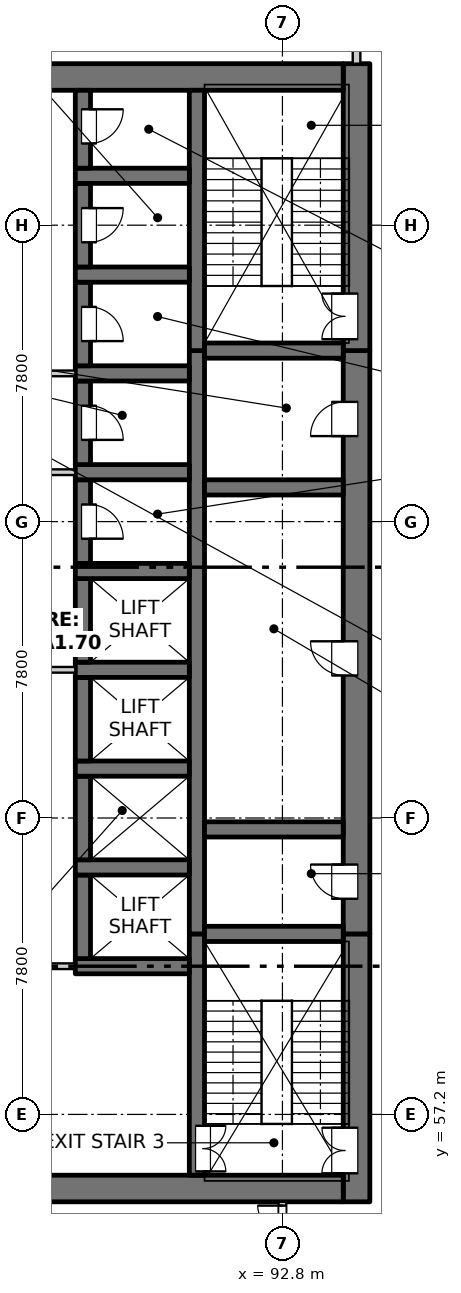
"""IFC4 building model, lengths in metres.
Left out: names, types, materials, properties, quantities, classifications, styles, units other than length and angle.
Written with IfcOpenShell. Run it as: python <this file> out.ifc"""

import sys

from ifc_helpers import new_model, si_unit, direction, frame, frame_2d, origin, place, context, subcontext, project, spatial, rectangle, extrude, element, fill, save


model = new_model("IFC4")
c1 = context("Model", 3, precision=1e-05, world=origin(), true_north=direction((0.0, 1.0)))
c2 = subcontext(c1, "Body", "Model", "MODEL_VIEW")
j1 = project(units=[si_unit("LENGTHUNIT", "METRE"), si_unit("PLANEANGLEUNIT", "RADIAN")], contexts=[c1])
p1 = place(None, origin())
s1 = spatial("IfcSite", under=j1, at=p1, CompositionType="ELEMENT")
p2 = place(p1, origin())
s2 = spatial("IfcBuilding", under=s1, at=p2, CompositionType="ELEMENT")
p3 = place(p2, frame((0.0, 0.0, 6.0)))
s3 = spatial("IfcBuildingStorey", under=s2, at=p3, CompositionType="ELEMENT", Elevation=6.0)
p4 = place(p3, frame((94.75, 54.9, -0.3), z_axis=(0.0, 0.0, 1.0), x_axis=(0.0, 1.0, 0.0)))
e1 = element("IfcWall", 1, at=p4, inside=s3, PredefinedType="SOLIDWALL", context=c2, shape_type="SweptSolid", body=[
    extrude(rectangle(XDim=7.05, YDim=0.7, at=frame_2d((3.525, 0.0))), origin(), (0.0, 0.0, 1.0), 4.5),
])
p5 = place(p4, frame((0.75, 0.0, 0.3)))
e2 = element("IfcOpeningElement", 2, at=p5, cuts=e1, PredefinedType="OPENING", context=c2, shape_type="SweptSolid", body=[
    extrude(rectangle(XDim=1.2, YDim=2.1, at=frame_2d((0.6, 1.05))), frame((0.0, 0.36, 0.0), z_axis=(0.0, -1.0, 0.0), x_axis=(1.0, 0.0, 0.0)), (0.0, 0.0, 1.0), 0.72),
])
p6 = place(p3, frame((94.75, 61.95, -0.3), z_axis=(0.0, 0.0, 1.0), x_axis=(0.0, 1.0, 0.0)))
e3 = element("IfcWall", 3, at=p6, inside=s3, PredefinedType="SOLIDWALL", context=c2, shape_type="SweptSolid", body=[
    extrude(rectangle(XDim=15.35, YDim=0.7, at=frame_2d((7.675, 0.0))), origin(), (0.0, 0.0, 1.0), 4.5),
])
p7 = place(p6, frame((0.925, 0.0, 0.3)))
e4 = element("IfcOpeningElement", 4, at=p7, cuts=e3, PredefinedType="OPENING", context=c2, shape_type="SweptSolid", body=[
    extrude(rectangle(XDim=0.9, YDim=2.1, at=frame_2d((0.45, 1.05))), frame((0.0, 0.36, 0.0), z_axis=(0.0, -1.0, 0.0), x_axis=(1.0, 0.0, 0.0)), (0.0, 0.0, 1.0), 0.72),
])
p8 = place(p6, frame((6.8, 0.0, 0.3)))
e5 = element("IfcOpeningElement", 5, at=p8, cuts=e3, PredefinedType="OPENING", context=c2, shape_type="SweptSolid", body=[
    extrude(rectangle(XDim=0.9, YDim=2.1, at=frame_2d((0.45, 1.05))), frame((0.0, 0.36, 0.0), z_axis=(0.0, -1.0, 0.0), x_axis=(1.0, 0.0, 0.0)), (0.0, 0.0, 1.0), 0.72),
])
p9 = place(p6, frame((13.1, 0.0, 0.3)))
e6 = element("IfcOpeningElement", 6, at=p9, cuts=e3, PredefinedType="OPENING", context=c2, shape_type="SweptSolid", body=[
    extrude(rectangle(XDim=0.9, YDim=2.1, at=frame_2d((0.45, 1.05))), frame((0.0, 0.36, 0.0), z_axis=(0.0, -1.0, 0.0), x_axis=(1.0, 0.0, 0.0)), (0.0, 0.0, 1.0), 0.72),
])
p10 = place(p3, frame((94.75, 77.3, -0.3), z_axis=(0.0, 0.0, 1.0), x_axis=(0.0, 1.0, 0.0)))
e7 = element("IfcWall", 7, at=p10, inside=s3, PredefinedType="SOLIDWALL", context=c2, shape_type="SweptSolid", body=[
    extrude(rectangle(XDim=7.55, YDim=0.7, at=frame_2d((3.775, 0.0))), origin(), (0.0, 0.0, 1.0), 4.5),
])
p11 = place(p10, frame((0.3, 0.0, 0.3)))
e8 = element("IfcOpeningElement", 8, at=p11, cuts=e7, PredefinedType="OPENING", context=c2, shape_type="SweptSolid", body=[
    extrude(rectangle(XDim=1.2, YDim=2.1, at=frame_2d((0.6, 1.05))), frame((0.0, 0.36, 0.0), z_axis=(0.0, -1.0, 0.0), x_axis=(1.0, 0.0, 0.0)), (0.0, 0.0, 1.0), 0.72),
])
p12 = place(p3, frame((75.6, 55.25, -0.3), z_axis=(0.0, 0.0, 1.0), x_axis=(1.0, 0.0, 0.0)))
e9 = element("IfcWall", 9, at=p12, inside=s3, PredefinedType="SOLIDWALL", context=c2, shape_type="SweptSolid", body=[
    extrude(rectangle(XDim=18.8, YDim=0.7, at=frame_2d((9.4, 0.0))), origin(), (0.0, 0.0, 1.0), 4.5),
])
p13 = place(p12, frame((8.65, 0.0, 0.3)))
e10 = element("IfcOpeningElement", 10, at=p13, cuts=e9, PredefinedType="OPENING", context=c2, shape_type="SweptSolid", body=[
    extrude(rectangle(XDim=1.5, YDim=2.1, at=frame_2d((0.75, 1.05))), frame((0.0, 0.36, 0.0), z_axis=(0.0, -1.0, 0.0), x_axis=(1.0, 0.0, 0.0)), (0.0, 0.0, 1.0), 0.72),
])
p14 = place(p3, frame((75.6, 84.5, -0.3), z_axis=(0.0, 0.0, 1.0), x_axis=(1.0, 0.0, 0.0)))
e11 = element("IfcWall", 11, at=p14, inside=s3, PredefinedType="SOLIDWALL", context=c2, shape_type="SweptSolid", body=[
    extrude(rectangle(XDim=18.8, YDim=0.7, at=frame_2d((9.4, 0.0))), origin(), (0.0, 0.0, 1.0), 4.5),
])
p15 = place(p3, frame((90.55, 55.6, -0.3), z_axis=(0.0, 0.0, 1.0), x_axis=(0.0, 1.0, 0.0)))
e12 = element("IfcWall", 12, at=p15, inside=s3, PredefinedType="SOLIDWALL", context=c2, shape_type="SweptSolid", body=[
    extrude(rectangle(XDim=6.35, YDim=0.4, at=frame_2d((3.175, 0.0))), origin(), (0.0, 0.0, 1.0), 4.5),
])
p16 = place(p15, frame((0.1, 0.0, 0.3)))
e13 = element("IfcOpeningElement", 13, at=p16, cuts=e12, PredefinedType="OPENING", context=c2, shape_type="SweptSolid", body=[
    extrude(rectangle(XDim=1.2, YDim=2.1, at=frame_2d((0.6, 1.05))), frame((0.0, 0.21, 0.0), z_axis=(0.0, -1.0, 0.0), x_axis=(1.0, 0.0, 0.0)), (0.0, 0.0, 1.0), 0.42),
])
p17 = place(p3, frame((90.55, 61.95, -0.3), z_axis=(0.0, 0.0, 1.0), x_axis=(0.0, 1.0, 0.0)))
e14 = element("IfcWall", 14, at=p17, inside=s3, PredefinedType="SOLIDWALL", context=c2, shape_type="SweptSolid", body=[
    extrude(rectangle(XDim=15.35, YDim=0.4, at=frame_2d((7.675, 0.0))), origin(), (0.0, 0.0, 1.0), 4.5),
])
p18 = place(p3, frame((90.55, 77.3, -0.3), z_axis=(0.0, 0.0, 1.0), x_axis=(0.0, 1.0, 0.0)))
e15 = element("IfcWall", 15, at=p18, inside=s3, PredefinedType="SOLIDWALL", context=c2, shape_type="SweptSolid", body=[
    extrude(rectangle(XDim=6.85, YDim=0.4, at=frame_2d((3.425, 0.0))), origin(), (0.0, 0.0, 1.0), 4.5),
])
p19 = place(p3, frame((87.35, 61.1, -0.3), z_axis=(0.0, 0.0, 1.0), x_axis=(1.0, 0.0, 0.0)))
e16 = element("IfcWall", 16, at=p19, inside=s3, PredefinedType="SOLIDWALL", context=c2, shape_type="SweptSolid", body=[
    extrude(rectangle(XDim=3.0, YDim=0.4, at=frame_2d((1.5, 0.0))), origin(), (0.0, 0.0, 1.0), 4.5),
])
p20 = place(p3, frame((87.55, 61.3, -0.3), z_axis=(0.0, 0.0, 1.0), x_axis=(0.0, 1.0, 0.0)))
e17 = element("IfcWall", 17, at=p20, inside=s3, PredefinedType="SOLIDWALL", context=c2, shape_type="SweptSolid", body=[
    extrude(rectangle(XDim=2.2, YDim=0.4, at=frame_2d((1.1, 0.0))), origin(), (0.0, 0.0, 1.0), 4.5),
])
p21 = place(p3, frame((87.35, 63.7, -0.3), z_axis=(0.0, 0.0, 1.0), x_axis=(1.0, 0.0, 0.0)))
e18 = element("IfcWall", 18, at=p21, inside=s3, PredefinedType="SOLIDWALL", context=c2, shape_type="SweptSolid", body=[
    extrude(rectangle(XDim=3.0, YDim=0.4, at=frame_2d((1.5, 0.0))), origin(), (0.0, 0.0, 1.0), 4.5),
])
p22 = place(p3, frame((87.55, 63.9, -0.3), z_axis=(0.0, 0.0, 1.0), x_axis=(0.0, 1.0, 0.0)))
e19 = element("IfcWall", 19, at=p22, inside=s3, PredefinedType="SOLIDWALL", context=c2, shape_type="SweptSolid", body=[
    extrude(rectangle(XDim=2.2, YDim=0.4, at=frame_2d((1.1, 0.0))), origin(), (0.0, 0.0, 1.0), 4.5),
])
p23 = place(p3, frame((87.35, 66.3, -0.3), z_axis=(0.0, 0.0, 1.0), x_axis=(1.0, 0.0, 0.0)))
e20 = element("IfcWall", 20, at=p23, inside=s3, PredefinedType="SOLIDWALL", context=c2, shape_type="SweptSolid", body=[
    extrude(rectangle(XDim=3.0, YDim=0.4, at=frame_2d((1.5, 0.0))), origin(), (0.0, 0.0, 1.0), 4.5),
])
p24 = place(p3, frame((87.55, 66.5, -0.3), z_axis=(0.0, 0.0, 1.0), x_axis=(0.0, 1.0, 0.0)))
e21 = element("IfcWall", 21, at=p24, inside=s3, PredefinedType="SOLIDWALL", context=c2, shape_type="SweptSolid", body=[
    extrude(rectangle(XDim=2.2, YDim=0.4, at=frame_2d((1.1, 0.0))), origin(), (0.0, 0.0, 1.0), 4.5),
])
p25 = place(p3, frame((87.35, 68.9, -0.3), z_axis=(0.0, 0.0, 1.0), x_axis=(1.0, 0.0, 0.0)))
e22 = element("IfcWall", 22, at=p25, inside=s3, PredefinedType="SOLIDWALL", context=c2, shape_type="SweptSolid", body=[
    extrude(rectangle(XDim=3.0, YDim=0.4, at=frame_2d((1.5, 0.0))), origin(), (0.0, 0.0, 1.0), 4.5),
])
p26 = place(p3, frame((87.55, 69.1, -0.3), z_axis=(0.0, 0.0, 1.0), x_axis=(0.0, 1.0, 0.0)))
e23 = element("IfcWall", 23, at=p26, inside=s3, PredefinedType="SOLIDWALL", context=c2, shape_type="SweptSolid", body=[
    extrude(rectangle(XDim=2.2, YDim=0.4, at=frame_2d((1.1, 0.0))), origin(), (0.0, 0.0, 1.0), 4.5),
])
p27 = place(p3, frame((87.35, 71.5, -0.3), z_axis=(0.0, 0.0, 1.0), x_axis=(1.0, 0.0, 0.0)))
e24 = element("IfcWall", 24, at=p27, inside=s3, PredefinedType="SOLIDWALL", context=c2, shape_type="SweptSolid", body=[
    extrude(rectangle(XDim=3.0, YDim=0.4, at=frame_2d((1.5, 0.0))), origin(), (0.0, 0.0, 1.0), 4.5),
])
p28 = place(p3, frame((87.55, 71.7, -0.3), z_axis=(0.0, 0.0, 1.0), x_axis=(0.0, 1.0, 0.0)))
e25 = element("IfcWall", 25, at=p28, inside=s3, PredefinedType="SOLIDWALL", context=c2, shape_type="SweptSolid", body=[
    extrude(rectangle(XDim=2.2, YDim=0.4, at=frame_2d((1.1, 0.0))), origin(), (0.0, 0.0, 1.0), 4.5),
])
p29 = place(p28, frame((0.65, 0.0, 0.3)))
e26 = element("IfcOpeningElement", 26, at=p29, cuts=e25, PredefinedType="OPENING", context=c2, shape_type="SweptSolid", body=[
    extrude(rectangle(XDim=0.9, YDim=2.1, at=frame_2d((0.45, 1.05))), frame((0.0, 0.21, 0.0), z_axis=(0.0, -1.0, 0.0), x_axis=(1.0, 0.0, 0.0)), (0.0, 0.0, 1.0), 0.42),
])
p30 = place(p3, frame((87.35, 74.1, -0.3), z_axis=(0.0, 0.0, 1.0), x_axis=(1.0, 0.0, 0.0)))
e27 = element("IfcWall", 27, at=p30, inside=s3, PredefinedType="SOLIDWALL", context=c2, shape_type="SweptSolid", body=[
    extrude(rectangle(XDim=3.0, YDim=0.4, at=frame_2d((1.5, 0.0))), origin(), (0.0, 0.0, 1.0), 4.5),
])
p31 = place(p3, frame((87.55, 74.3, -0.3), z_axis=(0.0, 0.0, 1.0), x_axis=(0.0, 1.0, 0.0)))
e28 = element("IfcWall", 28, at=p31, inside=s3, PredefinedType="SOLIDWALL", context=c2, shape_type="SweptSolid", body=[
    extrude(rectangle(XDim=2.2, YDim=0.4, at=frame_2d((1.1, 0.0))), origin(), (0.0, 0.0, 1.0), 4.5),
])
p32 = place(p31, frame((0.65, 0.0, 0.3)))
e29 = element("IfcOpeningElement", 29, at=p32, cuts=e28, PredefinedType="OPENING", context=c2, shape_type="SweptSolid", body=[
    extrude(rectangle(XDim=0.9, YDim=2.1, at=frame_2d((0.45, 1.05))), frame((0.0, 0.21, 0.0), z_axis=(0.0, -1.0, 0.0), x_axis=(1.0, 0.0, 0.0)), (0.0, 0.0, 1.0), 0.42),
])
p33 = place(p3, frame((87.35, 76.7, -0.3), z_axis=(0.0, 0.0, 1.0), x_axis=(1.0, 0.0, 0.0)))
e30 = element("IfcWall", 30, at=p33, inside=s3, PredefinedType="SOLIDWALL", context=c2, shape_type="SweptSolid", body=[
    extrude(rectangle(XDim=3.0, YDim=0.4, at=frame_2d((1.5, 0.0))), origin(), (0.0, 0.0, 1.0), 4.5),
])
p34 = place(p3, frame((87.55, 76.9, -0.3), z_axis=(0.0, 0.0, 1.0), x_axis=(0.0, 1.0, 0.0)))
e31 = element("IfcWall", 31, at=p34, inside=s3, PredefinedType="SOLIDWALL", context=c2, shape_type="SweptSolid", body=[
    extrude(rectangle(XDim=2.2, YDim=0.4, at=frame_2d((1.1, 0.0))), origin(), (0.0, 0.0, 1.0), 4.5),
])
p35 = place(p34, frame((0.65, 0.0, 0.3)))
e32 = element("IfcOpeningElement", 32, at=p35, cuts=e31, PredefinedType="OPENING", context=c2, shape_type="SweptSolid", body=[
    extrude(rectangle(XDim=0.9, YDim=2.1, at=frame_2d((0.45, 1.05))), frame((0.0, 0.21, 0.0), z_axis=(0.0, -1.0, 0.0), x_axis=(1.0, 0.0, 0.0)), (0.0, 0.0, 1.0), 0.42),
])
p36 = place(p3, frame((87.35, 79.3, -0.3), z_axis=(0.0, 0.0, 1.0), x_axis=(1.0, 0.0, 0.0)))
e33 = element("IfcWall", 33, at=p36, inside=s3, PredefinedType="SOLIDWALL", context=c2, shape_type="SweptSolid", body=[
    extrude(rectangle(XDim=3.0, YDim=0.4, at=frame_2d((1.5, 0.0))), origin(), (0.0, 0.0, 1.0), 4.5),
])
p37 = place(p3, frame((87.55, 79.5, -0.3), z_axis=(0.0, 0.0, 1.0), x_axis=(0.0, 1.0, 0.0)))
e34 = element("IfcWall", 34, at=p37, inside=s3, PredefinedType="SOLIDWALL", context=c2, shape_type="SweptSolid", body=[
    extrude(rectangle(XDim=2.2, YDim=0.4, at=frame_2d((1.1, 0.0))), origin(), (0.0, 0.0, 1.0), 4.5),
])
p38 = place(p37, frame((0.65, 0.0, 0.3)))
e35 = element("IfcOpeningElement", 35, at=p38, cuts=e34, PredefinedType="OPENING", context=c2, shape_type="SweptSolid", body=[
    extrude(rectangle(XDim=0.9, YDim=2.1, at=frame_2d((0.45, 1.05))), frame((0.0, 0.21, 0.0), z_axis=(0.0, -1.0, 0.0), x_axis=(1.0, 0.0, 0.0)), (0.0, 0.0, 1.0), 0.42),
])
p39 = place(p3, frame((87.35, 81.9, -0.3), z_axis=(0.0, 0.0, 1.0), x_axis=(1.0, 0.0, 0.0)))
e36 = element("IfcWall", 36, at=p39, inside=s3, PredefinedType="SOLIDWALL", context=c2, shape_type="SweptSolid", body=[
    extrude(rectangle(XDim=3.0, YDim=0.4, at=frame_2d((1.5, 0.0))), origin(), (0.0, 0.0, 1.0), 4.5),
])
p40 = place(p3, frame((87.55, 82.1, -0.3), z_axis=(0.0, 0.0, 1.0), x_axis=(0.0, 1.0, 0.0)))
e37 = element("IfcWall", 37, at=p40, inside=s3, PredefinedType="SOLIDWALL", context=c2, shape_type="SweptSolid", body=[
    extrude(rectangle(XDim=2.05, YDim=0.4, at=frame_2d((1.025, 0.0))), origin(), (0.0, 0.0, 1.0), 4.5),
])
p41 = place(p40, frame((0.65, 0.0, 0.3)))
e38 = element("IfcOpeningElement", 38, at=p41, cuts=e37, PredefinedType="OPENING", context=c2, shape_type="SweptSolid", body=[
    extrude(rectangle(XDim=0.9, YDim=2.1, at=frame_2d((0.45, 1.05))), frame((0.0, 0.21, 0.0), z_axis=(0.0, -1.0, 0.0), x_axis=(1.0, 0.0, 0.0)), (0.0, 0.0, 1.0), 0.42),
])
for number, where, z_axis, x_axis in (
    (39, (90.75, 61.95, -0.3), (0.0, 0.0, 1.0), (1.0, 0.0, 0.0)),
    (40, (90.75, 64.7, -0.3), (0.0, 0.0, 1.0), (1.0, 0.0, 0.0)),
    (41, (90.75, 73.7, -0.3), (0.0, 0.0, 1.0), (1.0, 0.0, 0.0)),
    (42, (90.75, 77.3, -0.3), (0.0, 0.0, 1.0), (1.0, 0.0, 0.0)),
):
    element("IfcWall", number, at=place(p3, frame(where, z_axis=z_axis, x_axis=x_axis)), inside=s3, PredefinedType="SOLIDWALL", context=c2, shape_type="SweptSolid", body=[
        extrude(rectangle(XDim=3.65, YDim=0.4, at=frame_2d((1.825, 0.0))), origin(), (0.0, 0.0, 1.0), 4.5),
    ])
p42 = place(p3, frame((82.65, 61.1, 0.0), z_axis=(0.0, 0.0, 1.0), x_axis=(1.0, 0.0, 0.0)))
e43 = element("IfcWall", 43, at=p42, inside=s3, PredefinedType="PARTITIONING", context=c2, shape_type="SweptSolid", body=[
    extrude(rectangle(XDim=4.7, YDim=0.15, at=frame_2d((2.35, 0.0))), origin(), (0.0, 0.0, 1.0), 4.2),
])
p43 = place(p42, frame((1.45, 0.0, 0.0)))
e44 = element("IfcOpeningElement", 44, at=p43, cuts=e43, PredefinedType="OPENING", context=c2, shape_type="SweptSolid", body=[
    extrude(rectangle(XDim=1.8, YDim=2.1, at=frame_2d((0.9, 1.05))), frame((0.0, 0.085, 0.0), z_axis=(0.0, -1.0, 0.0), x_axis=(1.0, 0.0, 0.0)), (0.0, 0.0, 1.0), 0.17),
])
p44 = place(p3, frame((82.65, 68.9, 0.0), z_axis=(0.0, 0.0, 1.0), x_axis=(1.0, 0.0, 0.0)))
e45 = element("IfcWall", 45, at=p44, inside=s3, PredefinedType="PARTITIONING", context=c2, shape_type="SweptSolid", body=[
    extrude(rectangle(XDim=4.7, YDim=0.15, at=frame_2d((2.35, 0.0))), origin(), (0.0, 0.0, 1.0), 4.2),
])
p45 = place(p44, frame((1.45, 0.0, 0.0)))
e46 = element("IfcOpeningElement", 46, at=p45, cuts=e45, PredefinedType="OPENING", context=c2, shape_type="SweptSolid", body=[
    extrude(rectangle(XDim=1.8, YDim=2.1, at=frame_2d((0.9, 1.05))), frame((0.0, 0.085, 0.0), z_axis=(0.0, -1.0, 0.0), x_axis=(1.0, 0.0, 0.0)), (0.0, 0.0, 1.0), 0.17),
])
p46 = place(p3, frame((82.65, 74.1, 0.0), z_axis=(0.0, 0.0, 1.0), x_axis=(1.0, 0.0, 0.0)))
e47 = element("IfcWall", 47, at=p46, inside=s3, PredefinedType="PARTITIONING", context=c2, shape_type="SweptSolid", body=[
    extrude(rectangle(XDim=4.7, YDim=0.15, at=frame_2d((2.35, 0.0))), origin(), (0.0, 0.0, 1.0), 4.2),
])
p47 = place(p46, frame((1.45, 0.0, 0.0)))
e48 = element("IfcOpeningElement", 48, at=p47, cuts=e47, PredefinedType="OPENING", context=c2, shape_type="SweptSolid", body=[
    extrude(rectangle(XDim=1.8, YDim=2.1, at=frame_2d((0.9, 1.05))), frame((0.0, 0.085, 0.0), z_axis=(0.0, -1.0, 0.0), x_axis=(1.0, 0.0, 0.0)), (0.0, 0.0, 1.0), 0.17),
])
p48 = place(p3, frame((82.65, 76.7, 0.0), z_axis=(0.0, 0.0, 1.0), x_axis=(1.0, 0.0, 0.0)))
e49 = element("IfcWall", 49, at=p48, inside=s3, PredefinedType="PARTITIONING", context=c2, shape_type="SweptSolid", body=[
    extrude(rectangle(XDim=4.7, YDim=0.15, at=frame_2d((2.35, 0.0))), origin(), (0.0, 0.0, 1.0), 4.2),
])
p49 = place(p48, frame((1.45, 0.0, 0.0)))
e50 = element("IfcOpeningElement", 50, at=p49, cuts=e49, PredefinedType="OPENING", context=c2, shape_type="SweptSolid", body=[
    extrude(rectangle(XDim=1.8, YDim=2.1, at=frame_2d((0.9, 1.05))), frame((0.0, 0.085, 0.0), z_axis=(0.0, -1.0, 0.0), x_axis=(1.0, 0.0, 0.0)), (0.0, 0.0, 1.0), 0.17),
])
p50 = place(p3, frame((92.8, 53.4, 0.0), z_axis=(0.0, 0.0, 1.0), x_axis=(0.0, 1.0, 0.0)))
e51 = element("IfcWall", 51, at=p50, inside=s3, PredefinedType="PARTITIONING", context=c2, shape_type="SweptSolid", body=[
    extrude(rectangle(XDim=1.5, YDim=0.2, at=frame_2d((0.75, 0.0))), origin(), (0.0, 0.0, 1.0), 4.2),
])
p51 = place(p50, frame((0.1, 0.0, 0.0)))
e52 = element("IfcOpeningElement", 52, at=p51, cuts=e51, PredefinedType="OPENING", context=c2, shape_type="SweptSolid", body=[
    extrude(rectangle(XDim=1.3, YDim=2.1, at=frame_2d((0.65, 1.05))), frame((0.0, 0.11, 0.0), z_axis=(0.0, -1.0, 0.0), x_axis=(1.0, 0.0, 0.0)), (0.0, 0.0, 1.0), 0.22),
])
p52 = place(p3, frame((94.75, 84.85, 0.0), z_axis=(0.0, 0.0, 1.0), x_axis=(0.0, 1.0, 0.0)))
e53 = element("IfcWall", 53, at=p52, inside=s3, PredefinedType="PARTITIONING", context=c2, shape_type="SweptSolid", body=[
    extrude(rectangle(XDim=3.25, YDim=0.2, at=frame_2d((1.625, 0.0))), origin(), (0.0, 0.0, 1.0), 4.2),
])
p53 = place(p52, frame((1.0, 0.0, 0.0)))
e54 = element("IfcOpeningElement", 54, at=p53, cuts=e53, PredefinedType="OPENING", context=c2, shape_type="SweptSolid", body=[
    extrude(rectangle(XDim=1.2, YDim=2.1, at=frame_2d((0.6, 1.05))), frame((0.0, 0.11, 0.0), z_axis=(0.0, -1.0, 0.0), x_axis=(1.0, 0.0, 0.0)), (0.0, 0.0, 1.0), 0.22),
])
p54 = place(p51, origin())
e55 = element("IfcDoor", 55, at=p54, inside=s3, OperationType="DOUBLE_DOOR_SINGLE_SWING", PredefinedType="DOOR", context=c2, shape_type="SweptSolid", body=[
    extrude(rectangle(XDim=1.3, YDim=2.1, at=frame_2d((0.65, 1.05))), frame((0.0, 0.025, 0.0), z_axis=(0.0, -1.0, 0.0), x_axis=(1.0, 0.0, 0.0)), (0.0, 0.0, 1.0), 0.05),
])
fill(e52, e55)
p55 = place(p16, origin())
e56 = element("IfcDoor", 56, at=p55, inside=s3, OperationType="DOUBLE_DOOR_SINGLE_SWING", PredefinedType="DOOR", context=c2, shape_type="SweptSolid", body=[
    extrude(rectangle(XDim=1.2, YDim=2.1, at=frame_2d((0.6, 1.05))), frame((0.0, -0.135, 0.0), z_axis=(0.0, -1.0, 0.0), x_axis=(1.0, 0.0, 0.0)), (0.0, 0.0, 1.0), 0.05),
])
fill(e13, e56)
p56 = place(p5, origin())
e57 = element("IfcDoor", 57, at=p56, inside=s3, OperationType="DOUBLE_DOOR_SINGLE_SWING", PredefinedType="DOOR", context=c2, shape_type="SweptSolid", body=[
    extrude(rectangle(XDim=1.2, YDim=2.1, at=frame_2d((0.6, 1.05))), frame((0.0, 0.335, 0.0), z_axis=(0.0, -1.0, 0.0), x_axis=(1.0, 0.0, 0.0)), (0.0, 0.0, 1.0), 0.05),
])
fill(e2, e57)
p57 = place(p7, origin())
e58 = element("IfcDoor", 58, at=p57, inside=s3, OperationType="SINGLE_SWING_RIGHT", PredefinedType="DOOR", context=c2, shape_type="SweptSolid", body=[
    extrude(rectangle(XDim=0.9, YDim=2.1, at=frame_2d((0.45, 1.05))), frame((0.0, 0.335, 0.0), z_axis=(0.0, -1.0, 0.0), x_axis=(1.0, 0.0, 0.0)), (0.0, 0.0, 1.0), 0.05),
])
fill(e4, e58)
p58 = place(p8, origin())
e59 = element("IfcDoor", 59, at=p58, inside=s3, OperationType="SINGLE_SWING_RIGHT", PredefinedType="DOOR", context=c2, shape_type="SweptSolid", body=[
    extrude(rectangle(XDim=0.9, YDim=2.1, at=frame_2d((0.45, 1.05))), frame((0.0, 0.335, 0.0), z_axis=(0.0, -1.0, 0.0), x_axis=(1.0, 0.0, 0.0)), (0.0, 0.0, 1.0), 0.05),
])
fill(e5, e59)
p59 = place(p29, origin())
e60 = element("IfcDoor", 60, at=p59, inside=s3, OperationType="SINGLE_SWING_RIGHT", PredefinedType="DOOR", context=c2, shape_type="SweptSolid", body=[
    extrude(rectangle(XDim=0.9, YDim=2.1, at=frame_2d((0.45, 1.05))), frame((0.0, -0.135, 0.0), z_axis=(0.0, -1.0, 0.0), x_axis=(1.0, 0.0, 0.0)), (0.0, 0.0, 1.0), 0.05),
])
fill(e26, e60)
p60 = place(p32, origin())
e61 = element("IfcDoor", 61, at=p60, inside=s3, OperationType="SINGLE_SWING_RIGHT", PredefinedType="DOOR", context=c2, shape_type="SweptSolid", body=[
    extrude(rectangle(XDim=0.9, YDim=2.1, at=frame_2d((0.45, 1.05))), frame((0.0, -0.135, 0.0), z_axis=(0.0, -1.0, 0.0), x_axis=(1.0, 0.0, 0.0)), (0.0, 0.0, 1.0), 0.05),
])
fill(e29, e61)
p61 = place(p9, origin())
e62 = element("IfcDoor", 62, at=p61, inside=s3, OperationType="SINGLE_SWING_LEFT", PredefinedType="DOOR", context=c2, shape_type="SweptSolid", body=[
    extrude(rectangle(XDim=0.9, YDim=2.1, at=frame_2d((0.45, 1.05))), frame((0.0, 0.335, 0.0), z_axis=(0.0, -1.0, 0.0), x_axis=(1.0, 0.0, 0.0)), (0.0, 0.0, 1.0), 0.05),
])
fill(e6, e62)
p62 = place(p35, origin())
e63 = element("IfcDoor", 63, at=p62, inside=s3, OperationType="SINGLE_SWING_RIGHT", PredefinedType="DOOR", context=c2, shape_type="SweptSolid", body=[
    extrude(rectangle(XDim=0.9, YDim=2.1, at=frame_2d((0.45, 1.05))), frame((0.0, -0.135, 0.0), z_axis=(0.0, -1.0, 0.0), x_axis=(1.0, 0.0, 0.0)), (0.0, 0.0, 1.0), 0.05),
])
fill(e32, e63)
p63 = place(p11, origin())
e64 = element("IfcDoor", 64, at=p63, inside=s3, OperationType="DOUBLE_DOOR_SINGLE_SWING", PredefinedType="DOOR", context=c2, shape_type="SweptSolid", body=[
    extrude(rectangle(XDim=1.2, YDim=2.1, at=frame_2d((0.6, 1.05))), frame((0.0, 0.335, 0.0), z_axis=(0.0, -1.0, 0.0), x_axis=(1.0, 0.0, 0.0)), (0.0, 0.0, 1.0), 0.05),
])
fill(e8, e64)
p64 = place(p38, origin())
e65 = element("IfcDoor", 65, at=p64, inside=s3, OperationType="SINGLE_SWING_LEFT", PredefinedType="DOOR", context=c2, shape_type="SweptSolid", body=[
    extrude(rectangle(XDim=0.9, YDim=2.1, at=frame_2d((0.45, 1.05))), frame((0.0, -0.135, 0.0), z_axis=(0.0, -1.0, 0.0), x_axis=(1.0, 0.0, 0.0)), (0.0, 0.0, 1.0), 0.05),
])
fill(e35, e65)
p65 = place(p41, origin())
e66 = element("IfcDoor", 66, at=p65, inside=s3, OperationType="SINGLE_SWING_LEFT", PredefinedType="DOOR", context=c2, shape_type="SweptSolid", body=[
    extrude(rectangle(XDim=0.9, YDim=2.1, at=frame_2d((0.45, 1.05))), frame((0.0, -0.135, 0.0), z_axis=(0.0, -1.0, 0.0), x_axis=(1.0, 0.0, 0.0)), (0.0, 0.0, 1.0), 0.05),
])
fill(e38, e66)
save(model, sys.argv[1])
